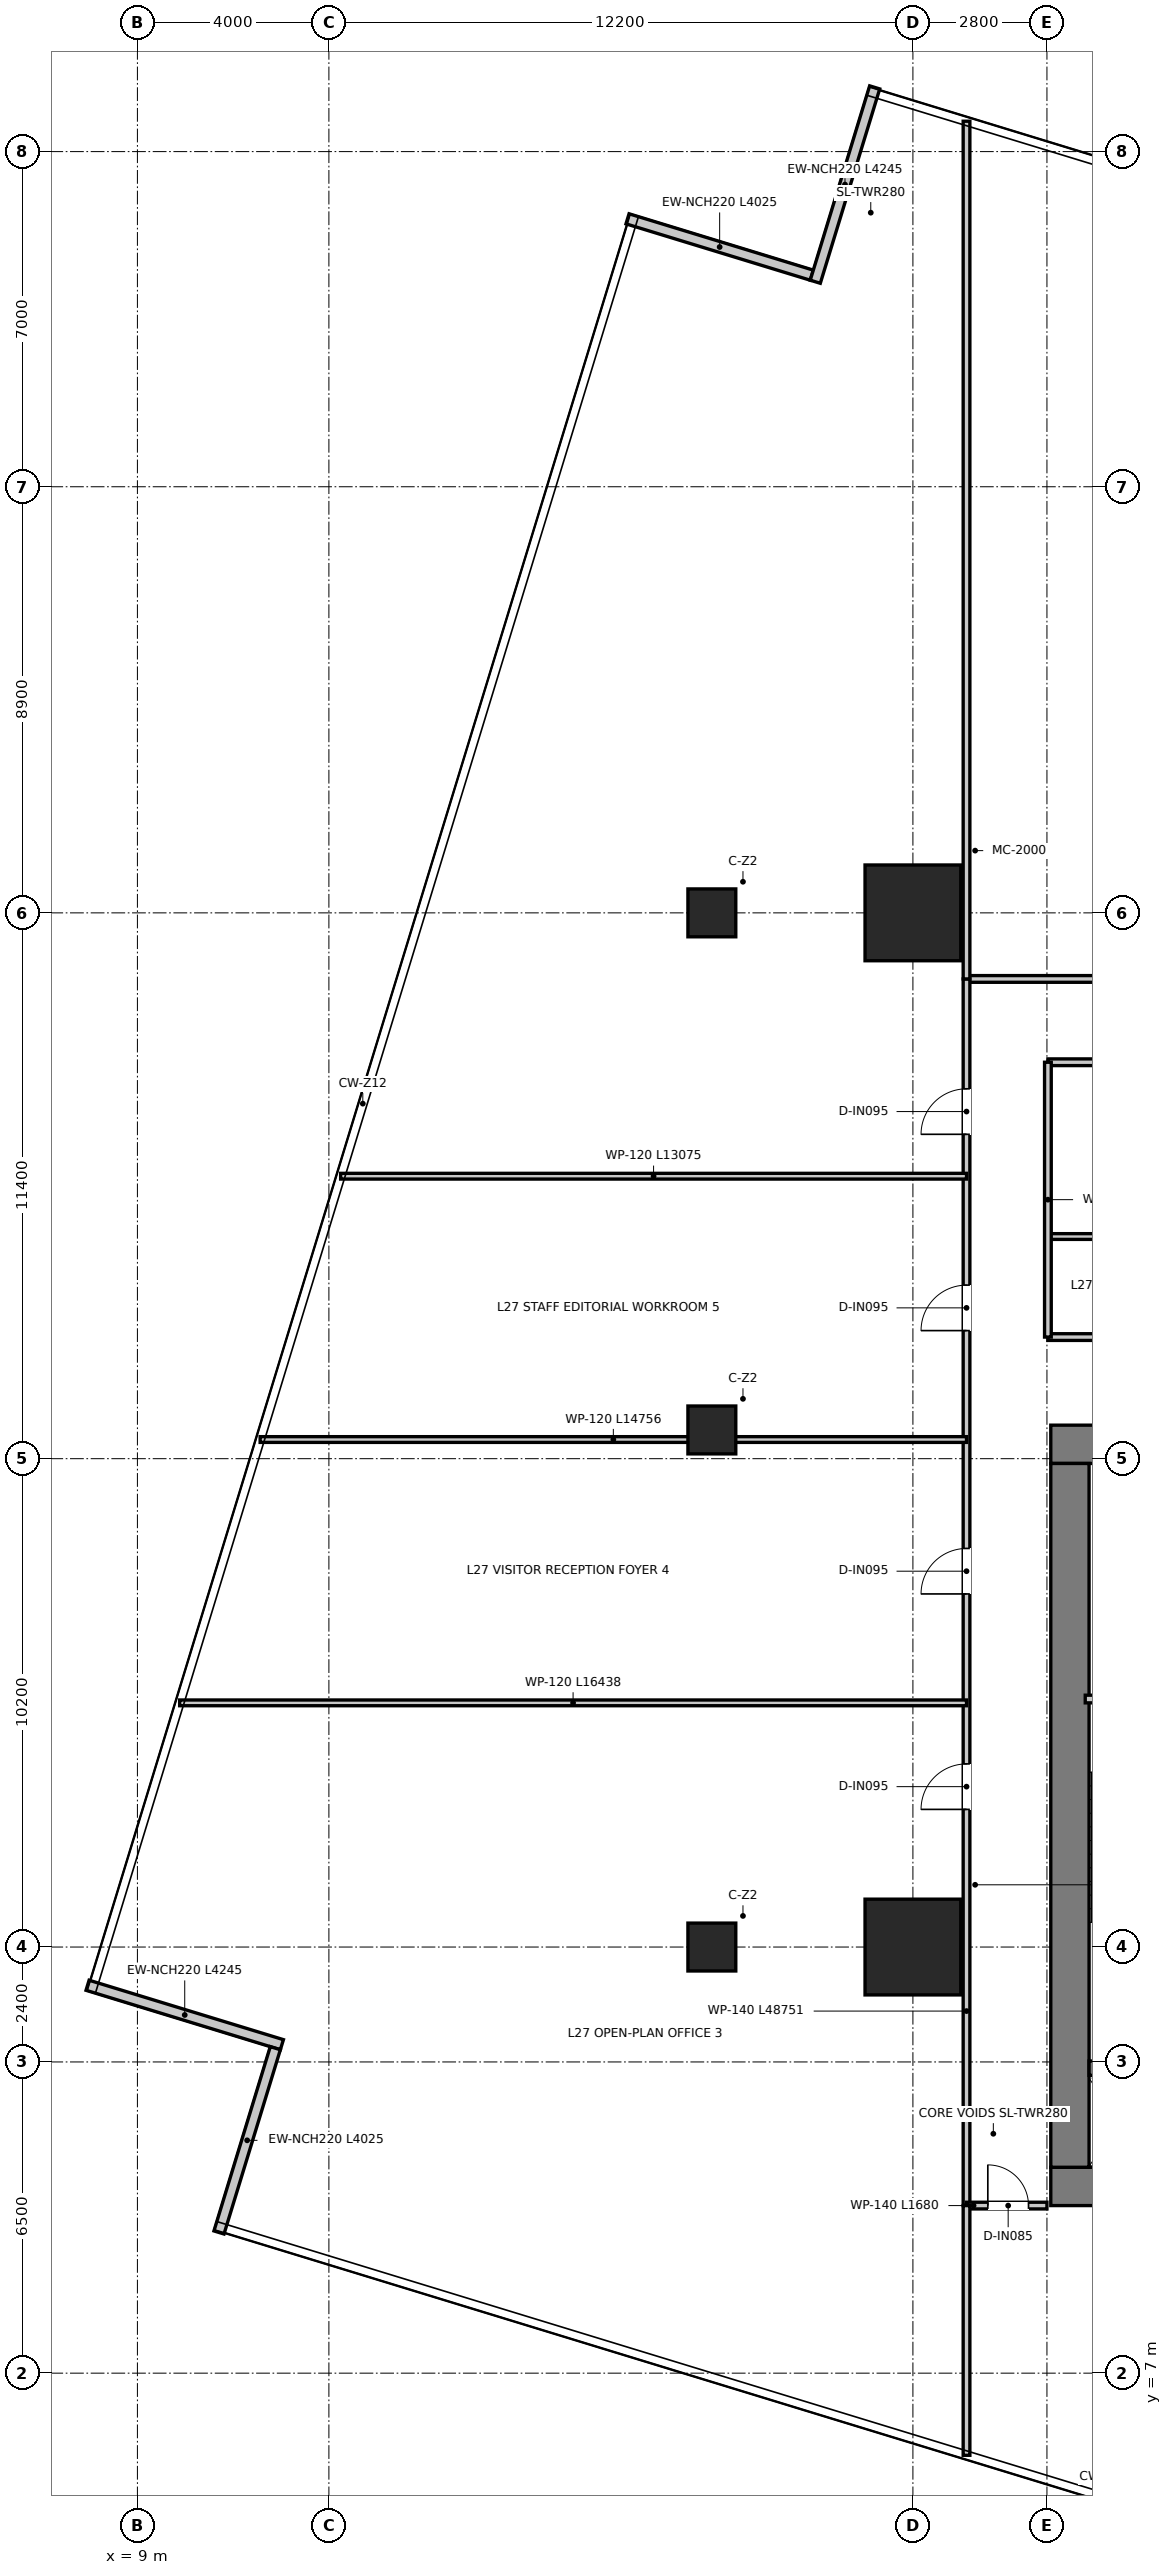
"""IFC4 building model, lengths in metres.
Left out: names, types, materials, properties, quantities, classifications, styles, units other than length and angle.
Written with IfcOpenShell. Run it as: python <this file> out.ifc"""

import sys

from ifc_helpers import new_model, si_unit, direction, frame, frame_2d, origin, origin_2d, place, context, subcontext, project, spatial, rectangle, extrude, source, transform, mapped, element, fill, save


model = new_model("IFC4")
c1 = context("Model", 3, precision=1e-05, world=origin(), true_north=direction((0.0, 1.0)))
c2 = subcontext(c1, "Body", "Model", "MODEL_VIEW")
j1 = project(units=[si_unit("LENGTHUNIT", "METRE"), si_unit("PLANEANGLEUNIT", "RADIAN")], contexts=[c1])
p1 = place(None, origin())
s1 = spatial("IfcSite", under=j1, at=p1, CompositionType="ELEMENT")
p2 = place(p1, origin())
s2 = spatial("IfcBuilding", under=s1, at=p2, CompositionType="ELEMENT")
p3 = place(p2, frame((0.0, 0.0, 113.75)))
s3 = spatial("IfcBuildingStorey", under=s2, at=p3, CompositionType="ELEMENT", Elevation=113.75)
p4 = place(p3, frame((28.08, 10.9, 0.0), z_axis=(0.0, 0.0, 1.0), x_axis=(1.0, 0.0, 0.0)))
e1 = element("IfcWall", 1, at=p4, inside=s3, PredefinedType="SHEAR", context=c2, shape_type="SweptSolid", body=[
    extrude(rectangle(XDim=15.84, YDim=0.8, at=frame_2d((7.92, 0.0))), origin(), (0.0, 0.0, 1.0), 3.95),
])
p5 = place(p3, frame((28.08, 26.4, 0.0), z_axis=(0.0, 0.0, 1.0), x_axis=(1.0, 0.0, 0.0)))
e2 = element("IfcWall", 2, at=p5, inside=s3, PredefinedType="SHEAR", context=c2, shape_type="SweptSolid", body=[
    extrude(rectangle(XDim=15.84, YDim=0.8, at=frame_2d((7.92, 0.0))), origin(), (0.0, 0.0, 1.0), 3.95),
])
p6 = place(p5, frame((7.22, 0.0, 0.0)))
e3 = element("IfcOpeningElement", 3, at=p6, cuts=e2, PredefinedType="OPENING", context=c2, shape_type="SweptSolid", body=[
    extrude(rectangle(XDim=1.4, YDim=2.2, at=frame_2d((0.7, 1.1))), frame((0.0, 0.41, 0.0), z_axis=(0.0, -1.0, 0.0), x_axis=(1.0, 0.0, 0.0)), (0.0, 0.0, 1.0), 0.82),
])
p7 = place(p5, frame((1.775, 0.0, 0.0)))
e4 = element("IfcOpeningElement", 4, at=p7, cuts=e2, PredefinedType="OPENING", context=c2, shape_type="SweptSolid", body=[
    extrude(rectangle(XDim=1.05, YDim=2.1, at=frame_2d((0.525, 1.05))), frame((0.0, 0.41, 0.0), z_axis=(0.0, -1.0, 0.0), x_axis=(1.0, 0.0, 0.0)), (0.0, 0.0, 1.0), 0.82),
])
p8 = place(p5, frame((13.015, 0.0, 0.0)))
e5 = element("IfcOpeningElement", 5, at=p8, cuts=e2, PredefinedType="OPENING", context=c2, shape_type="SweptSolid", body=[
    extrude(rectangle(XDim=1.05, YDim=2.1, at=frame_2d((0.525, 1.05))), frame((0.0, 0.41, 0.0), z_axis=(0.0, -1.0, 0.0), x_axis=(1.0, 0.0, 0.0)), (0.0, 0.0, 1.0), 0.82),
])
p9 = place(p3, frame((28.48, 11.3, 0.0), z_axis=(0.0, 0.0, 1.0), x_axis=(0.0, 1.0, 0.0)))
e6 = element("IfcWall", 6, at=p9, inside=s3, PredefinedType="SHEAR", context=c2, shape_type="SweptSolid", body=[
    extrude(rectangle(XDim=14.7, YDim=0.8, at=frame_2d((7.35, 0.0))), origin(), (0.0, 0.0, 1.0), 3.95),
])
p10 = place(p3, frame((28.88, 13.37, 0.0), z_axis=(0.0, 0.0, 1.0), x_axis=(1.0, 0.0, 0.0)))
e7 = element("IfcWall", 7, at=p10, inside=s3, PredefinedType="SHEAR", context=c2, shape_type="SweptSolid", body=[
    extrude(rectangle(XDim=3.1, YDim=0.3, at=frame_2d((1.55, 0.0))), origin(), (0.0, 0.0, 1.0), 3.95),
])
m1 = source(origin(), c2, "Body", "SweptSolid", [
    extrude(rectangle(XDim=2.0, YDim=2.0, at=origin_2d()), origin(), (0.0, 0.0, 1.0), 3.95),
])
for number, where, z_axis, x_axis in (
    (8, (25.2, 15.9, 0.0), (0.0, 0.0, 1.0), (1.0, 0.0, 0.0)),
    (9, (25.2, 37.5, 0.0), (0.0, 0.0, 1.0), (1.0, 0.0, 0.0)),
):
    element("IfcColumn", number, at=place(p3, frame(where, z_axis=z_axis, x_axis=x_axis)), inside=s3, PredefinedType="USERDEFINED", context=c2, shape_type="MappedRepresentation", body=[
        mapped(m1, transform((0.0, 0.0, 0.0), x_axis=(1.0, 0.0, 0.0), y_axis=(0.0, 1.0, 0.0), z_axis=(0.0, 0.0, 1.0), scale=1.0)),
    ])
m2 = source(origin(), c2, "Body", "SweptSolid", [
    extrude(rectangle(XDim=1.0, YDim=1.0, at=origin_2d()), origin(), (0.0, 0.0, 1.0), 3.95),
])
for number, where, z_axis, x_axis in (
    (10, (21.0, 15.9, 0.0), (0.0, 0.0, 1.0), (1.0, 0.0, 0.0)),
    (11, (21.0, 26.7, 0.0), (0.0, 0.0, 1.0), (1.0, 0.0, 0.0)),
    (12, (21.0, 37.5, 0.0), (0.0, 0.0, 1.0), (1.0, 0.0, 0.0)),
):
    element("IfcColumn", number, at=place(p3, frame(where, z_axis=z_axis, x_axis=x_axis)), inside=s3, PredefinedType="COLUMN", context=c2, shape_type="MappedRepresentation", body=[
        mapped(m2, transform((0.0, 0.0, 0.0), x_axis=(1.0, 0.0, 0.0), y_axis=(0.0, 1.0, 0.0), z_axis=(0.0, 0.0, 1.0), scale=1.0)),
    ])
p11 = place(p3, frame((23.088, 50.819, 0.0), z_axis=(0.0, 0.0, 1.0), x_axis=(-0.956307298529, 0.292363388235, 0.0)))
e13 = element("IfcWall", 13, at=p11, inside=s3, PredefinedType="ELEMENTEDWALL", context=c2, shape_type="SweptSolid", body=[
    extrude(rectangle(XDim=4.025, YDim=0.22, at=frame_2d((2.012, 0.0))), origin(), (0.0, 0.0, 1.0), 3.67),
])
p12 = place(p3, frame((7.959, 15.102, 0.0), z_axis=(0.0, 0.0, 1.0), x_axis=(0.95629976735, -0.292388021242, 0.0)))
e14 = element("IfcWall", 14, at=p12, inside=s3, PredefinedType="ELEMENTEDWALL", context=c2, shape_type="SweptSolid", body=[
    extrude(rectangle(XDim=4.245, YDim=0.22, at=frame_2d((2.123, 0.0))), origin(), (0.0, 0.0, 1.0), 3.67),
])
p13 = place(p3, frame((11.881, 13.788, 0.0), z_axis=(0.0, 0.0, 1.0), x_axis=(-0.292363388235, -0.956307298529, 0.0)))
e15 = element("IfcWall", 15, at=p13, inside=s3, PredefinedType="ELEMENTEDWALL", context=c2, shape_type="SweptSolid", body=[
    extrude(rectangle(XDim=4.025, YDim=0.22, at=frame_2d((2.012, 0.0))), origin(), (0.0, 0.0, 1.0), 3.67),
])
p14 = place(p3, frame((24.402, 54.741, 0.0), z_axis=(0.0, 0.0, 1.0), x_axis=(-0.292351504488, -0.956310931561, 0.0)))
e16 = element("IfcWall", 16, at=p14, inside=s3, PredefinedType="ELEMENTEDWALL", context=c2, shape_type="SweptSolid", body=[
    extrude(rectangle(XDim=4.245, YDim=0.22, at=frame_2d((2.123, 0.0))), origin(), (0.0, 0.0, 1.0), 3.67),
])
p15 = place(p3, frame((28.8, 21.08, 0.0), z_axis=(0.0, 0.0, 1.0), x_axis=(1.0, 0.0, 0.0)))
e17 = element("IfcWall", 17, at=p15, inside=s3, PredefinedType="PARTITIONING", context=c2, shape_type="SweptSolid", body=[
    extrude(rectangle(XDim=3.16, YDim=0.16, at=frame_2d((1.58, 0.0))), origin(), (0.0, 0.0, 1.0), 3.67),
])
p16 = place(p15, frame((1.055, 0.0, 0.0)))
e18 = element("IfcOpeningElement", 18, at=p16, cuts=e17, PredefinedType="OPENING", context=c2, shape_type="SweptSolid", body=[
    extrude(rectangle(XDim=1.05, YDim=2.1, at=frame_2d((0.525, 1.05))), frame((0.0, 0.09, 0.0), z_axis=(0.0, -1.0, 0.0), x_axis=(1.0, 0.0, 0.0)), (0.0, 0.0, 1.0), 0.18),
])
p17 = place(p3, frame((28.02, 28.64, 0.0), z_axis=(0.0, 0.0, 1.0), x_axis=(1.0, 0.0, 0.0)))
e19 = element("IfcWall", 19, at=p17, inside=s3, PredefinedType="PARTITIONING", context=c2, shape_type="SweptSolid", body=[
    extrude(rectangle(XDim=15.96, YDim=0.14, at=frame_2d((7.98, 0.0))), origin(), (0.0, 0.0, 1.0), 3.08),
])
p18 = place(p17, frame((7.455, 0.0, 0.0)))
e20 = element("IfcOpeningElement", 20, at=p18, cuts=e19, PredefinedType="OPENING", context=c2, shape_type="SweptSolid", body=[
    extrude(rectangle(XDim=1.05, YDim=2.15, at=frame_2d((0.525, 1.075))), frame((0.0, 0.08, 0.0), z_axis=(0.0, -1.0, 0.0), x_axis=(1.0, 0.0, 0.0)), (0.0, 0.0, 1.0), 0.16),
])
p19 = place(p3, frame((28.02, 30.74, 0.0), z_axis=(0.0, 0.0, 1.0), x_axis=(1.0, 0.0, 0.0)))
e21 = element("IfcWall", 21, at=p19, inside=s3, PredefinedType="PARTITIONING", context=c2, shape_type="SweptSolid", body=[
    extrude(rectangle(XDim=15.96, YDim=0.12, at=frame_2d((7.98, 0.0))), origin(), (0.0, 0.0, 1.0), 3.08),
])
p20 = place(p3, frame((28.02, 34.38, 0.0), z_axis=(0.0, 0.0, 1.0), x_axis=(1.0, 0.0, 0.0)))
e22 = element("IfcWall", 22, at=p20, inside=s3, PredefinedType="PARTITIONING", context=c2, shape_type="SweptSolid", body=[
    extrude(rectangle(XDim=15.96, YDim=0.14, at=frame_2d((7.98, 0.0))), origin(), (0.0, 0.0, 1.0), 3.08),
])
p21 = place(p20, frame((7.83, 0.0, 0.0)))
e23 = element("IfcOpeningElement", 23, at=p21, cuts=e22, PredefinedType="OPENING", context=c2, shape_type="SweptSolid", body=[
    extrude(rectangle(XDim=0.9, YDim=2.1, at=frame_2d((0.45, 1.05))), frame((0.0, 0.08, 0.0), z_axis=(0.0, -1.0, 0.0), x_axis=(1.0, 0.0, 0.0)), (0.0, 0.0, 1.0), 0.16),
])
p22 = place(p20, frame((11.03, 0.0, 0.0)))
e24 = element("IfcOpeningElement", 24, at=p22, cuts=e22, PredefinedType="OPENING", context=c2, shape_type="SweptSolid", body=[
    extrude(rectangle(XDim=0.9, YDim=2.1, at=frame_2d((0.45, 1.05))), frame((0.0, 0.08, 0.0), z_axis=(0.0, -1.0, 0.0), x_axis=(1.0, 0.0, 0.0)), (0.0, 0.0, 1.0), 0.16),
])
p23 = place(p20, frame((14.055, 0.0, 0.0)))
e25 = element("IfcOpeningElement", 25, at=p23, cuts=e22, PredefinedType="OPENING", context=c2, shape_type="SweptSolid", body=[
    extrude(rectangle(XDim=0.95, YDim=2.1, at=frame_2d((0.475, 1.05))), frame((0.0, 0.08, 0.0), z_axis=(0.0, -1.0, 0.0), x_axis=(1.0, 0.0, 0.0)), (0.0, 0.0, 1.0), 0.16),
])
p24 = place(p20, frame((2.855, 0.0, 0.0)))
e26 = element("IfcOpeningElement", 26, at=p24, cuts=e22, PredefinedType="OPENING", context=c2, shape_type="SweptSolid", body=[
    extrude(rectangle(XDim=0.95, YDim=2.1, at=frame_2d((0.475, 1.05))), frame((0.0, 0.08, 0.0), z_axis=(0.0, -1.0, 0.0), x_axis=(1.0, 0.0, 0.0)), (0.0, 0.0, 1.0), 0.16),
])
p25 = place(p3, frame((28.02, 28.64, 0.0), z_axis=(0.0, 0.0, 1.0), x_axis=(0.0, 1.0, 0.0)))
e27 = element("IfcWall", 27, at=p25, inside=s3, PredefinedType="PARTITIONING", context=c2, shape_type="SweptSolid", body=[
    extrude(rectangle(XDim=5.74, YDim=0.14, at=frame_2d((2.87, 0.0))), origin(), (0.0, 0.0, 1.0), 3.27),
])
p26 = place(p3, frame((26.32, 36.12, 0.0), z_axis=(0.0, 0.0, 1.0), x_axis=(1.0, 0.0, 0.0)))
e28 = element("IfcWall", 28, at=p26, inside=s3, PredefinedType="PARTITIONING", context=c2, shape_type="SweptSolid", body=[
    extrude(rectangle(XDim=19.36, YDim=0.14, at=frame_2d((9.68, 0.0))), origin(), (0.0, 0.0, 1.0), 3.08),
])
p27 = place(p26, frame((5.115, 0.0, 0.0)))
e29 = element("IfcOpeningElement", 29, at=p27, cuts=e28, PredefinedType="OPENING", context=c2, shape_type="SweptSolid", body=[
    extrude(rectangle(XDim=0.95, YDim=2.1, at=frame_2d((0.475, 1.05))), frame((0.0, 0.08, 0.0), z_axis=(0.0, -1.0, 0.0), x_axis=(1.0, 0.0, 0.0)), (0.0, 0.0, 1.0), 0.16),
])
p28 = place(p26, frame((14.795, 0.0, 0.0)))
e30 = element("IfcOpeningElement", 30, at=p28, cuts=e28, PredefinedType="OPENING", context=c2, shape_type="SweptSolid", body=[
    extrude(rectangle(XDim=0.95, YDim=2.1, at=frame_2d((0.475, 1.05))), frame((0.0, 0.08, 0.0), z_axis=(0.0, -1.0, 0.0), x_axis=(1.0, 0.0, 0.0)), (0.0, 0.0, 1.0), 0.16),
])
p29 = place(p3, frame((26.32, 10.5, 0.0), z_axis=(0.0, 0.0, 1.0), x_axis=(0.0, 1.0, 0.0)))
e31 = element("IfcWall", 31, at=p29, inside=s3, PredefinedType="PARTITIONING", context=c2, shape_type="SweptSolid", body=[
    extrude(rectangle(XDim=25.62, YDim=0.14, at=frame_2d((12.81, 0.0))), origin(), (0.0, 0.0, 1.0), 2.97),
])
p30 = place(p29, frame((8.275, 0.0, 0.0)))
e32 = element("IfcOpeningElement", 32, at=p30, cuts=e31, PredefinedType="OPENING", context=c2, shape_type="SweptSolid", body=[
    extrude(rectangle(XDim=0.95, YDim=2.1, at=frame_2d((0.475, 1.05))), frame((0.0, 0.08, 0.0), z_axis=(0.0, -1.0, 0.0), x_axis=(1.0, 0.0, 0.0)), (0.0, 0.0, 1.0), 0.16),
])
p31 = place(p29, frame((12.775, 0.0, 0.0)))
e33 = element("IfcOpeningElement", 33, at=p31, cuts=e31, PredefinedType="OPENING", context=c2, shape_type="SweptSolid", body=[
    extrude(rectangle(XDim=0.95, YDim=2.1, at=frame_2d((0.475, 1.05))), frame((0.0, 0.08, 0.0), z_axis=(0.0, -1.0, 0.0), x_axis=(1.0, 0.0, 0.0)), (0.0, 0.0, 1.0), 0.16),
])
p32 = place(p29, frame((18.275, 0.0, 0.0)))
e34 = element("IfcOpeningElement", 34, at=p32, cuts=e31, PredefinedType="OPENING", context=c2, shape_type="SweptSolid", body=[
    extrude(rectangle(XDim=0.95, YDim=2.1, at=frame_2d((0.475, 1.05))), frame((0.0, 0.08, 0.0), z_axis=(0.0, -1.0, 0.0), x_axis=(1.0, 0.0, 0.0)), (0.0, 0.0, 1.0), 0.16),
])
p33 = place(p29, frame((22.375, 0.0, 0.0)))
e35 = element("IfcOpeningElement", 35, at=p33, cuts=e31, PredefinedType="OPENING", context=c2, shape_type="SweptSolid", body=[
    extrude(rectangle(XDim=0.95, YDim=2.1, at=frame_2d((0.475, 1.05))), frame((0.0, 0.08, 0.0), z_axis=(0.0, -1.0, 0.0), x_axis=(1.0, 0.0, 0.0)), (0.0, 0.0, 1.0), 0.16),
])
p34 = place(p3, frame((26.32, 10.5, 0.0), z_axis=(0.0, 0.0, 1.0), x_axis=(1.0, 0.0, 0.0)))
e36 = element("IfcWall", 36, at=p34, inside=s3, PredefinedType="PARTITIONING", context=c2, shape_type="SweptSolid", body=[
    extrude(rectangle(XDim=1.68, YDim=0.14, at=frame_2d((0.84, 0.0))), origin(), (0.0, 0.0, 1.0), 3.67),
])
p35 = place(p34, frame((0.445, 0.0, 0.0)))
e37 = element("IfcOpeningElement", 37, at=p35, cuts=e36, PredefinedType="OPENING", context=c2, shape_type="SweptSolid", body=[
    extrude(rectangle(XDim=0.85, YDim=2.1, at=frame_2d((0.425, 1.05))), frame((0.0, 0.08, 0.0), z_axis=(0.0, -1.0, 0.0), x_axis=(1.0, 0.0, 0.0)), (0.0, 0.0, 1.0), 0.16),
])
p36 = place(p3, frame((26.32, 36.12, 0.0), z_axis=(0.0, 0.0, 1.0), x_axis=(0.0, 1.0, 0.0)))
e38 = element("IfcWall", 38, at=p36, inside=s3, PredefinedType="PARTITIONING", context=c2, shape_type="SweptSolid", body=[
    extrude(rectangle(XDim=17.914, YDim=0.14, at=frame_2d((8.957, 0.0))), origin(), (0.0, 0.0, 1.0), 2.97),
])
p37 = place(p3, frame((26.32, 5.284, 0.0), z_axis=(0.0, 0.0, 1.0), x_axis=(0.0, 1.0, 0.0)))
e39 = element("IfcWall", 39, at=p37, inside=s3, PredefinedType="PARTITIONING", context=c2, shape_type="SweptSolid", body=[
    extrude(rectangle(XDim=5.216, YDim=0.14, at=frame_2d((2.608, 0.0))), origin(), (0.0, 0.0, 1.0), 3.67),
])
p38 = place(p3, frame((9.882, 21.0, 0.0), z_axis=(0.0, 0.0, 1.0), x_axis=(1.0, 0.0, 0.0)))
e40 = element("IfcWall", 40, at=p38, inside=s3, PredefinedType="PARTITIONING", context=c2, shape_type="SweptSolid", body=[
    extrude(rectangle(XDim=16.438, YDim=0.12, at=frame_2d((8.219, 0.0))), origin(), (0.0, 0.0, 1.0), 2.97),
])
p39 = place(p3, frame((11.564, 26.5, 0.0), z_axis=(0.0, 0.0, 1.0), x_axis=(1.0, 0.0, 0.0)))
e41 = element("IfcWall", 41, at=p39, inside=s3, PredefinedType="PARTITIONING", context=c2, shape_type="SweptSolid", body=[
    extrude(rectangle(XDim=14.756, YDim=0.12, at=frame_2d((7.378, 0.0))), origin(), (0.0, 0.0, 1.0), 2.97),
])
p40 = place(p3, frame((13.245, 32.0, 0.0), z_axis=(0.0, 0.0, 1.0), x_axis=(1.0, 0.0, 0.0)))
e42 = element("IfcWall", 42, at=p40, inside=s3, PredefinedType="PARTITIONING", context=c2, shape_type="SweptSolid", body=[
    extrude(rectangle(XDim=13.075, YDim=0.12, at=frame_2d((6.537, 0.0))), origin(), (0.0, 0.0, 1.0), 2.97),
])
p41 = place(p30, origin())
e43 = element("IfcDoor", 43, at=p41, inside=s3, OperationType="SINGLE_SWING_LEFT", PredefinedType="DOOR", context=c2, shape_type="SweptSolid", body=[
    extrude(rectangle(XDim=0.95, YDim=2.1, at=frame_2d((0.475, 1.05))), frame((0.0, 0.025, 0.0), z_axis=(0.0, -1.0, 0.0), x_axis=(1.0, 0.0, 0.0)), (0.0, 0.0, 1.0), 0.05),
])
fill(e32, e43)
p42 = place(p31, origin())
e44 = element("IfcDoor", 44, at=p42, inside=s3, OperationType="SINGLE_SWING_LEFT", PredefinedType="DOOR", context=c2, shape_type="SweptSolid", body=[
    extrude(rectangle(XDim=0.95, YDim=2.1, at=frame_2d((0.475, 1.05))), frame((0.0, 0.025, 0.0), z_axis=(0.0, -1.0, 0.0), x_axis=(1.0, 0.0, 0.0)), (0.0, 0.0, 1.0), 0.05),
])
fill(e33, e44)
p43 = place(p32, origin())
e45 = element("IfcDoor", 45, at=p43, inside=s3, OperationType="SINGLE_SWING_LEFT", PredefinedType="DOOR", context=c2, shape_type="SweptSolid", body=[
    extrude(rectangle(XDim=0.95, YDim=2.1, at=frame_2d((0.475, 1.05))), frame((0.0, 0.025, 0.0), z_axis=(0.0, -1.0, 0.0), x_axis=(1.0, 0.0, 0.0)), (0.0, 0.0, 1.0), 0.05),
])
fill(e34, e45)
p44 = place(p33, origin())
e46 = element("IfcDoor", 46, at=p44, inside=s3, OperationType="SINGLE_SWING_LEFT", PredefinedType="DOOR", context=c2, shape_type="SweptSolid", body=[
    extrude(rectangle(XDim=0.95, YDim=2.1, at=frame_2d((0.475, 1.05))), frame((0.0, 0.025, 0.0), z_axis=(0.0, -1.0, 0.0), x_axis=(1.0, 0.0, 0.0)), (0.0, 0.0, 1.0), 0.05),
])
fill(e35, e46)
p45 = place(p35, origin())
e47 = element("IfcDoor", 47, at=p45, inside=s3, OperationType="SINGLE_SWING_LEFT", PredefinedType="DOOR", context=c2, shape_type="SweptSolid", body=[
    extrude(rectangle(XDim=0.85, YDim=2.1, at=frame_2d((0.425, 1.05))), frame((0.0, 0.025, 0.0), z_axis=(0.0, -1.0, 0.0), x_axis=(1.0, 0.0, 0.0)), (0.0, 0.0, 1.0), 0.05),
])
fill(e37, e47)
save(model, sys.argv[1])
